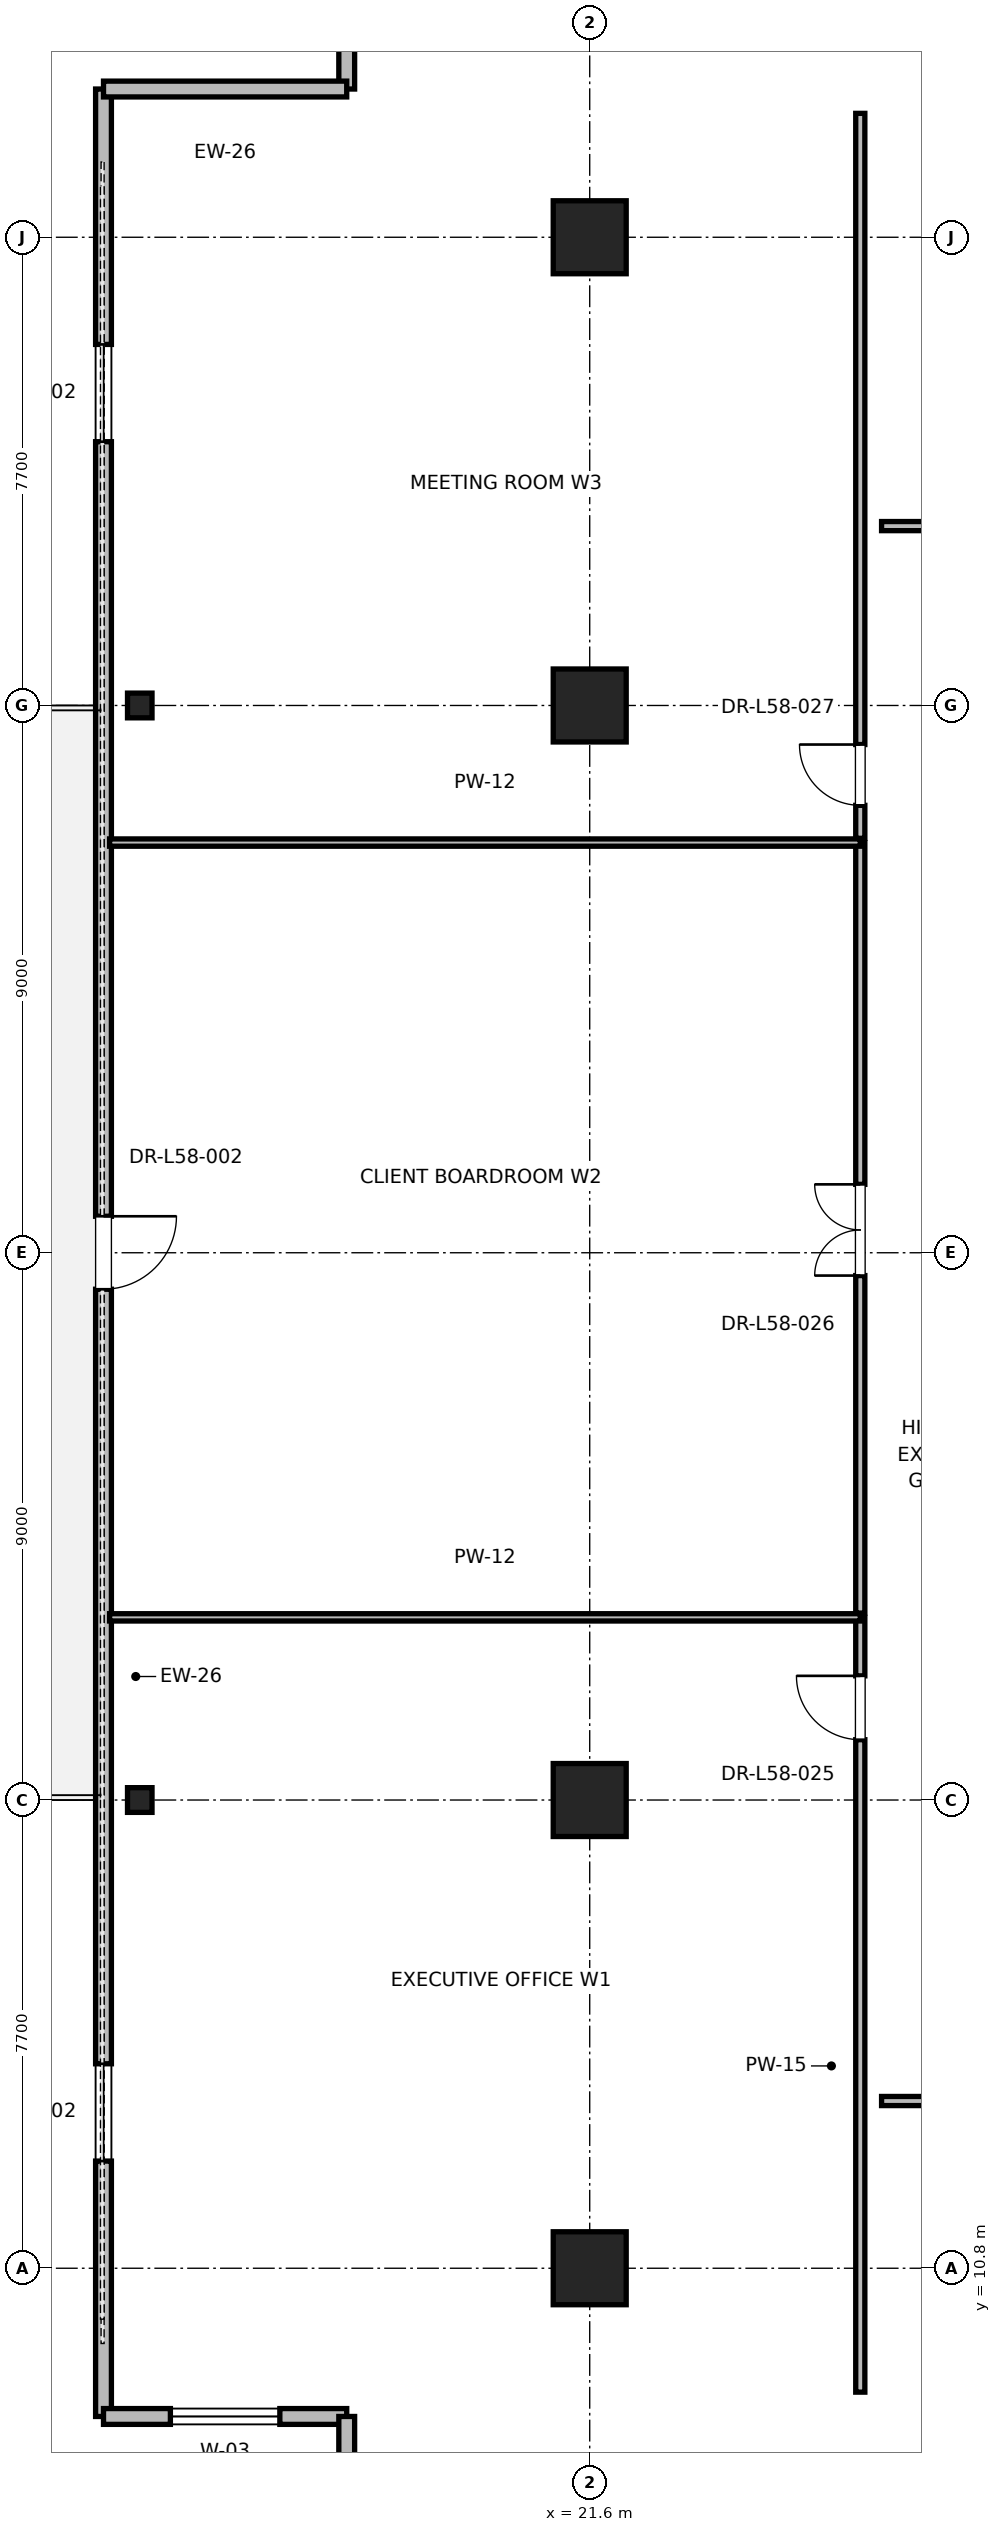
"""IFC4 building model, lengths in metres.
Left out: names, types, materials, properties, quantities, classifications, styles, units other than length and angle.
Written with IfcOpenShell. Run it as: python <this file> out.ifc"""

import sys

from ifc_helpers import new_model, si_unit, direction, frame, frame_2d, origin, origin_2d, place, context, subcontext, project, spatial, rectangle, i_section, extrude, element, fill, save


model = new_model("IFC4")
c1 = context("Model", 3, precision=1e-05, world=origin(), true_north=direction((0.0, 1.0)))
c2 = subcontext(c1, "Body", "Model", "MODEL_VIEW")
j1 = project(units=[si_unit("LENGTHUNIT", "METRE"), si_unit("PLANEANGLEUNIT", "RADIAN")], contexts=[c1])
p1 = place(None, origin())
s1 = spatial("IfcSite", under=j1, at=p1, CompositionType="ELEMENT")
p2 = place(p1, origin())
s2 = spatial("IfcBuilding", under=s1, at=p2, CompositionType="ELEMENT")
p3 = place(p2, frame((0.0, 0.0, 251.2)))
s3 = spatial("IfcBuildingStorey", under=s2, at=p3, CompositionType="ELEMENT", Elevation=251.2)
for number, where, z_axis, x_axis in (
    (1, (21.6, 18.5, 0.0), (0.0, 0.0, 1.0), (1.0, 0.0, 0.0)),
    (2, (21.6, 36.5, 0.0), (0.0, 0.0, 1.0), (1.0, 0.0, 0.0)),
    (3, (21.6, 10.8, 0.0), (0.0, 0.0, 1.0), (1.0, 0.0, 0.0)),
    (4, (21.6, 44.2, 0.0), (0.0, 0.0, 1.0), (1.0, 0.0, 0.0)),
):
    element("IfcColumn", number, at=place(p3, frame(where, z_axis=z_axis, x_axis=x_axis)), inside=s3, PredefinedType="COLUMN", context=c2, shape_type="SweptSolid", body=[
        extrude(rectangle(XDim=1.2, YDim=1.2, at=origin_2d()), origin(), (0.0, 0.0, 1.0), 4.0),
    ])
for number, where, z_axis, x_axis in (
    (5, (14.2, 18.5, 0.0), (0.0, 0.0, 1.0), (1.0, 0.0, 0.0)),
    (6, (14.2, 36.5, 0.0), (0.0, 0.0, 1.0), (1.0, 0.0, 0.0)),
):
    element("IfcColumn", number, at=place(p3, frame(where, z_axis=z_axis, x_axis=x_axis)), inside=s3, PredefinedType="COLUMN", context=c2, shape_type="SweptSolid", body=[
        extrude(i_section(OverallWidth=0.403, OverallDepth=0.406, WebThickness=0.027, FlangeThickness=0.043, FilletRadius=0.015, at=origin_2d()), origin(), (0.0, 0.0, 1.0), 4.0),
    ])
p4 = place(p3, frame((13.604, 46.638, 0.0), z_axis=(0.0, 0.0, 1.0), x_axis=(0.0, -1.0, 0.0)))
e7 = element("IfcWall", 7, at=p4, inside=s3, PredefinedType="PARAPET", context=c2, shape_type="SweptSolid", body=[
    extrude(rectangle(XDim=38.275, YDim=0.26, at=frame_2d((19.138, 0.0))), origin(), (0.0, 0.0, 1.0), 3.273),
])
p5 = place(p4, frame((4.2, 0.0, 0.85)))
e8 = element("IfcOpeningElement", 8, at=p5, cuts=e7, PredefinedType="OPENING", context=c2, shape_type="SweptSolid", body=[
    extrude(rectangle(XDim=1.6, YDim=2.1, at=frame_2d((0.8, 1.05))), frame((0.0, 0.13, 0.0), z_axis=(0.0, -1.0, 0.0), x_axis=(1.0, 0.0, 0.0)), (0.0, 0.0, 1.0), 0.26),
])
p6 = place(p4, frame((18.538, 0.0, 0.0)))
e9 = element("IfcOpeningElement", 9, at=p6, cuts=e7, PredefinedType="OPENING", context=c2, shape_type="SweptSolid", body=[
    extrude(rectangle(XDim=1.2, YDim=2.2, at=frame_2d((0.6, 1.1))), frame((0.0, 0.13, 0.0), z_axis=(0.0, -1.0, 0.0), x_axis=(1.0, 0.0, 0.0)), (0.0, 0.0, 1.0), 0.26),
])
p7 = place(p4, frame((32.475, 0.0, 0.85)))
e10 = element("IfcOpeningElement", 10, at=p7, cuts=e7, PredefinedType="OPENING", context=c2, shape_type="SweptSolid", body=[
    extrude(rectangle(XDim=1.6, YDim=2.1, at=frame_2d((0.8, 1.05))), frame((0.0, 0.13, 0.0), z_axis=(0.0, -1.0, 0.0), x_axis=(1.0, 0.0, 0.0)), (0.0, 0.0, 1.0), 0.26),
])
p8 = place(p3, frame((13.604, 8.362, 0.0), z_axis=(0.0, 0.0, 1.0), x_axis=(1.0, 0.0, 0.0)))
e11 = element("IfcWall", 11, at=p8, inside=s3, PredefinedType="PARAPET", context=c2, shape_type="SweptSolid", body=[
    extrude(rectangle(XDim=4.0, YDim=0.26, at=frame_2d((2.0, 0.0))), origin(), (0.0, 0.0, 1.0), 3.785),
])
p9 = place(p8, frame((1.1, 0.0, 0.85)))
e12 = element("IfcOpeningElement", 12, at=p9, cuts=e11, PredefinedType="OPENING", context=c2, shape_type="SweptSolid", body=[
    extrude(rectangle(XDim=1.8, YDim=2.2, at=frame_2d((0.9, 1.1))), frame((0.0, 0.13, 0.0), z_axis=(0.0, -1.0, 0.0), x_axis=(1.0, 0.0, 0.0)), (0.0, 0.0, 1.0), 0.26),
])
p10 = place(p3, frame((17.604, 8.362, 0.0), z_axis=(0.0, 0.0, 1.0), x_axis=(0.0, -1.0, 0.0)))
e13 = element("IfcWall", 13, at=p10, inside=s3, PredefinedType="PARAPET", context=c2, shape_type="SweptSolid", body=[
    extrude(rectangle(XDim=3.5, YDim=0.26, at=frame_2d((1.75, 0.0))), origin(), (0.0, 0.0, 1.0), 3.785),
])
p11 = place(p3, frame((17.604, 50.138, 0.0), z_axis=(0.0, 0.0, 1.0), x_axis=(0.0, -1.0, 0.0)))
e14 = element("IfcWall", 14, at=p11, inside=s3, PredefinedType="PARAPET", context=c2, shape_type="SweptSolid", body=[
    extrude(rectangle(XDim=3.5, YDim=0.26, at=frame_2d((1.75, 0.0))), origin(), (0.0, 0.0, 1.0), 3.785),
])
p12 = place(p11, frame((0.85, 0.0, 0.85)))
e15 = element("IfcOpeningElement", 15, at=p12, cuts=e14, PredefinedType="OPENING", context=c2, shape_type="SweptSolid", body=[
    extrude(rectangle(XDim=1.8, YDim=2.2, at=frame_2d((0.9, 1.1))), frame((0.0, 0.13, 0.0), z_axis=(0.0, -1.0, 0.0), x_axis=(1.0, 0.0, 0.0)), (0.0, 0.0, 1.0), 0.26),
])
p13 = place(p3, frame((17.604, 46.638, 0.0), z_axis=(0.0, 0.0, 1.0), x_axis=(-1.0, 0.0, 0.0)))
e16 = element("IfcWall", 16, at=p13, inside=s3, PredefinedType="PARAPET", context=c2, shape_type="SweptSolid", body=[
    extrude(rectangle(XDim=4.0, YDim=0.26, at=frame_2d((2.0, 0.0))), origin(), (0.0, 0.0, 1.0), 3.785),
])
p14 = place(p3, frame((26.4, 39.45, 0.0), z_axis=(0.0, 0.0, 1.0), x_axis=(1.0, 0.0, 0.0)))
e17 = element("IfcWall", 17, at=p14, inside=s3, PredefinedType="PARTITIONING", context=c2, shape_type="SweptSolid", body=[
    extrude(rectangle(XDim=8.704, YDim=0.15, at=frame_2d((4.352, 0.0))), origin(), (0.0, 0.0, 1.0), 2.85),
])
p15 = place(p14, frame((3.867, 0.0, 0.0)))
e18 = element("IfcOpeningElement", 18, at=p15, cuts=e17, PredefinedType="OPENING", context=c2, shape_type="SweptSolid", body=[
    extrude(rectangle(XDim=1.0, YDim=2.15, at=frame_2d((0.5, 1.075))), frame((0.0, 0.075, 0.0), z_axis=(0.0, -1.0, 0.0), x_axis=(1.0, 0.0, 0.0)), (0.0, 0.0, 1.0), 0.15),
])
p16 = place(p3, frame((26.4, 13.55, 0.0), z_axis=(0.0, 0.0, 1.0), x_axis=(1.0, 0.0, 0.0)))
e19 = element("IfcWall", 19, at=p16, inside=s3, PredefinedType="PARTITIONING", context=c2, shape_type="SweptSolid", body=[
    extrude(rectangle(XDim=12.24, YDim=0.15, at=frame_2d((6.12, 0.0))), origin(), (0.0, 0.0, 1.0), 2.85),
])
p17 = place(p16, frame((5.635, 0.0, 0.0)))
e20 = element("IfcOpeningElement", 20, at=p17, cuts=e19, PredefinedType="OPENING", context=c2, shape_type="SweptSolid", body=[
    extrude(rectangle(XDim=1.0, YDim=2.15, at=frame_2d((0.5, 1.075))), frame((0.0, 0.075, 0.0), z_axis=(0.0, -1.0, 0.0), x_axis=(1.0, 0.0, 0.0)), (0.0, 0.0, 1.0), 0.15),
])
p18 = place(p3, frame((26.05, 8.762, 0.0), z_axis=(0.0, 0.0, 1.0), x_axis=(0.0, 1.0, 0.0)))
e21 = element("IfcWall", 21, at=p18, inside=s3, PredefinedType="PARTITIONING", context=c2, shape_type="SweptSolid", body=[
    extrude(rectangle(XDim=12.741, YDim=0.15, at=frame_2d((6.371, 0.0))), origin(), (0.0, 0.0, 1.0), 2.85),
])
p19 = place(p18, frame((10.729, 0.0, 0.0)))
e22 = element("IfcOpeningElement", 22, at=p19, cuts=e21, PredefinedType="OPENING", context=c2, shape_type="SweptSolid", body=[
    extrude(rectangle(XDim=1.05, YDim=2.2, at=frame_2d((0.525, 1.1))), frame((0.0, 0.075, 0.0), z_axis=(0.0, -1.0, 0.0), x_axis=(1.0, 0.0, 0.0)), (0.0, 0.0, 1.0), 0.15),
])
p20 = place(p3, frame((13.704, 21.504, 0.0), z_axis=(0.0, 0.0, 1.0), x_axis=(1.0, 0.0, 0.0)))
e23 = element("IfcWall", 23, at=p20, inside=s3, PredefinedType="PARTITIONING", context=c2, shape_type="SweptSolid", body=[
    extrude(rectangle(XDim=12.346, YDim=0.12, at=frame_2d((6.173, 0.0))), origin(), (0.0, 0.0, 1.0), 2.85),
])
p21 = place(p3, frame((26.05, 21.574, 0.0), z_axis=(0.0, 0.0, 1.0), x_axis=(0.0, 1.0, 0.0)))
e24 = element("IfcWall", 24, at=p21, inside=s3, PredefinedType="PARTITIONING", context=c2, shape_type="SweptSolid", body=[
    extrude(rectangle(XDim=12.672, YDim=0.15, at=frame_2d((6.336, 0.0))), origin(), (0.0, 0.0, 1.0), 2.85),
])
p22 = place(p21, frame((5.551, 0.0, 0.0)))
e25 = element("IfcOpeningElement", 25, at=p22, cuts=e24, PredefinedType="OPENING", context=c2, shape_type="SweptSolid", body=[
    extrude(rectangle(XDim=1.5, YDim=2.25, at=frame_2d((0.75, 1.125))), frame((0.0, 0.075, 0.0), z_axis=(0.0, -1.0, 0.0), x_axis=(1.0, 0.0, 0.0)), (0.0, 0.0, 1.0), 0.15),
])
p23 = place(p3, frame((13.704, 34.246, 0.0), z_axis=(0.0, 0.0, 1.0), x_axis=(1.0, 0.0, 0.0)))
e26 = element("IfcWall", 26, at=p23, inside=s3, PredefinedType="PARTITIONING", context=c2, shape_type="SweptSolid", body=[
    extrude(rectangle(XDim=12.346, YDim=0.12, at=frame_2d((6.173, 0.0))), origin(), (0.0, 0.0, 1.0), 2.85),
])
p24 = place(p3, frame((26.05, 34.315, 0.0), z_axis=(0.0, 0.0, 1.0), x_axis=(0.0, 1.0, 0.0)))
e27 = element("IfcWall", 27, at=p24, inside=s3, PredefinedType="PARTITIONING", context=c2, shape_type="SweptSolid", body=[
    extrude(rectangle(XDim=11.922, YDim=0.15, at=frame_2d((5.961, 0.0))), origin(), (0.0, 0.0, 1.0), 2.85),
])
p25 = place(p24, frame((0.542, 0.0, 0.0)))
e28 = element("IfcOpeningElement", 28, at=p25, cuts=e27, PredefinedType="OPENING", context=c2, shape_type="SweptSolid", body=[
    extrude(rectangle(XDim=1.0, YDim=2.15, at=frame_2d((0.5, 1.075))), frame((0.0, 0.075, 0.0), z_axis=(0.0, -1.0, 0.0), x_axis=(1.0, 0.0, 0.0)), (0.0, 0.0, 1.0), 0.15),
])
p26 = place(p5, origin())
e29 = element("IfcWindow", 29, at=p26, inside=s3, PartitioningType="SINGLE_PANEL", PredefinedType="WINDOW", context=c2, shape_type="SweptSolid", body=[
    extrude(rectangle(XDim=1.6, YDim=2.1, at=frame_2d((0.8, 1.05))), frame((0.0, 0.03, 0.0), z_axis=(0.0, -1.0, 0.0), x_axis=(1.0, 0.0, 0.0)), (0.0, 0.0, 1.0), 0.06),
])
fill(e8, e29)
p27 = place(p6, origin())
e30 = element("IfcDoor", 30, at=p27, inside=s3, OperationType="SINGLE_SWING_LEFT", PredefinedType="DOOR", context=c2, shape_type="SweptSolid", body=[
    extrude(rectangle(XDim=1.2, YDim=2.2, at=frame_2d((0.6, 1.1))), frame((0.0, 0.025, 0.0), z_axis=(0.0, -1.0, 0.0), x_axis=(1.0, 0.0, 0.0)), (0.0, 0.0, 1.0), 0.05),
])
fill(e9, e30)
p28 = place(p7, origin())
e31 = element("IfcWindow", 31, at=p28, inside=s3, PartitioningType="SINGLE_PANEL", PredefinedType="WINDOW", context=c2, shape_type="SweptSolid", body=[
    extrude(rectangle(XDim=1.6, YDim=2.1, at=frame_2d((0.8, 1.05))), frame((0.0, 0.03, 0.0), z_axis=(0.0, -1.0, 0.0), x_axis=(1.0, 0.0, 0.0)), (0.0, 0.0, 1.0), 0.06),
])
fill(e10, e31)
p29 = place(p9, origin())
e32 = element("IfcWindow", 32, at=p29, inside=s3, PartitioningType="SINGLE_PANEL", PredefinedType="WINDOW", context=c2, shape_type="SweptSolid", body=[
    extrude(rectangle(XDim=1.8, YDim=2.2, at=frame_2d((0.9, 1.1))), frame((0.0, 0.03, 0.0), z_axis=(0.0, -1.0, 0.0), x_axis=(1.0, 0.0, 0.0)), (0.0, 0.0, 1.0), 0.06),
])
fill(e12, e32)
p30 = place(p19, origin())
e33 = element("IfcDoor", 33, at=p30, inside=s3, OperationType="SINGLE_SWING_RIGHT", PredefinedType="DOOR", context=c2, shape_type="SweptSolid", body=[
    extrude(rectangle(XDim=1.05, YDim=2.2, at=frame_2d((0.525, 1.1))), frame((0.0, 0.025, 0.0), z_axis=(0.0, -1.0, 0.0), x_axis=(1.0, 0.0, 0.0)), (0.0, 0.0, 1.0), 0.05),
])
fill(e22, e33)
p31 = place(p22, origin())
e34 = element("IfcDoor", 34, at=p31, inside=s3, OperationType="DOUBLE_DOOR_SINGLE_SWING", PredefinedType="DOOR", context=c2, shape_type="SweptSolid", body=[
    extrude(rectangle(XDim=1.5, YDim=2.25, at=frame_2d((0.75, 1.125))), frame((0.0, 0.025, 0.0), z_axis=(0.0, -1.0, 0.0), x_axis=(1.0, 0.0, 0.0)), (0.0, 0.0, 1.0), 0.05),
])
fill(e25, e34)
p32 = place(p25, origin())
e35 = element("IfcDoor", 35, at=p32, inside=s3, OperationType="SINGLE_SWING_RIGHT", PredefinedType="DOOR", context=c2, shape_type="SweptSolid", body=[
    extrude(rectangle(XDim=1.0, YDim=2.15, at=frame_2d((0.5, 1.075))), frame((0.0, 0.025, 0.0), z_axis=(0.0, -1.0, 0.0), x_axis=(1.0, 0.0, 0.0)), (0.0, 0.0, 1.0), 0.05),
])
fill(e28, e35)
save(model, sys.argv[1])
